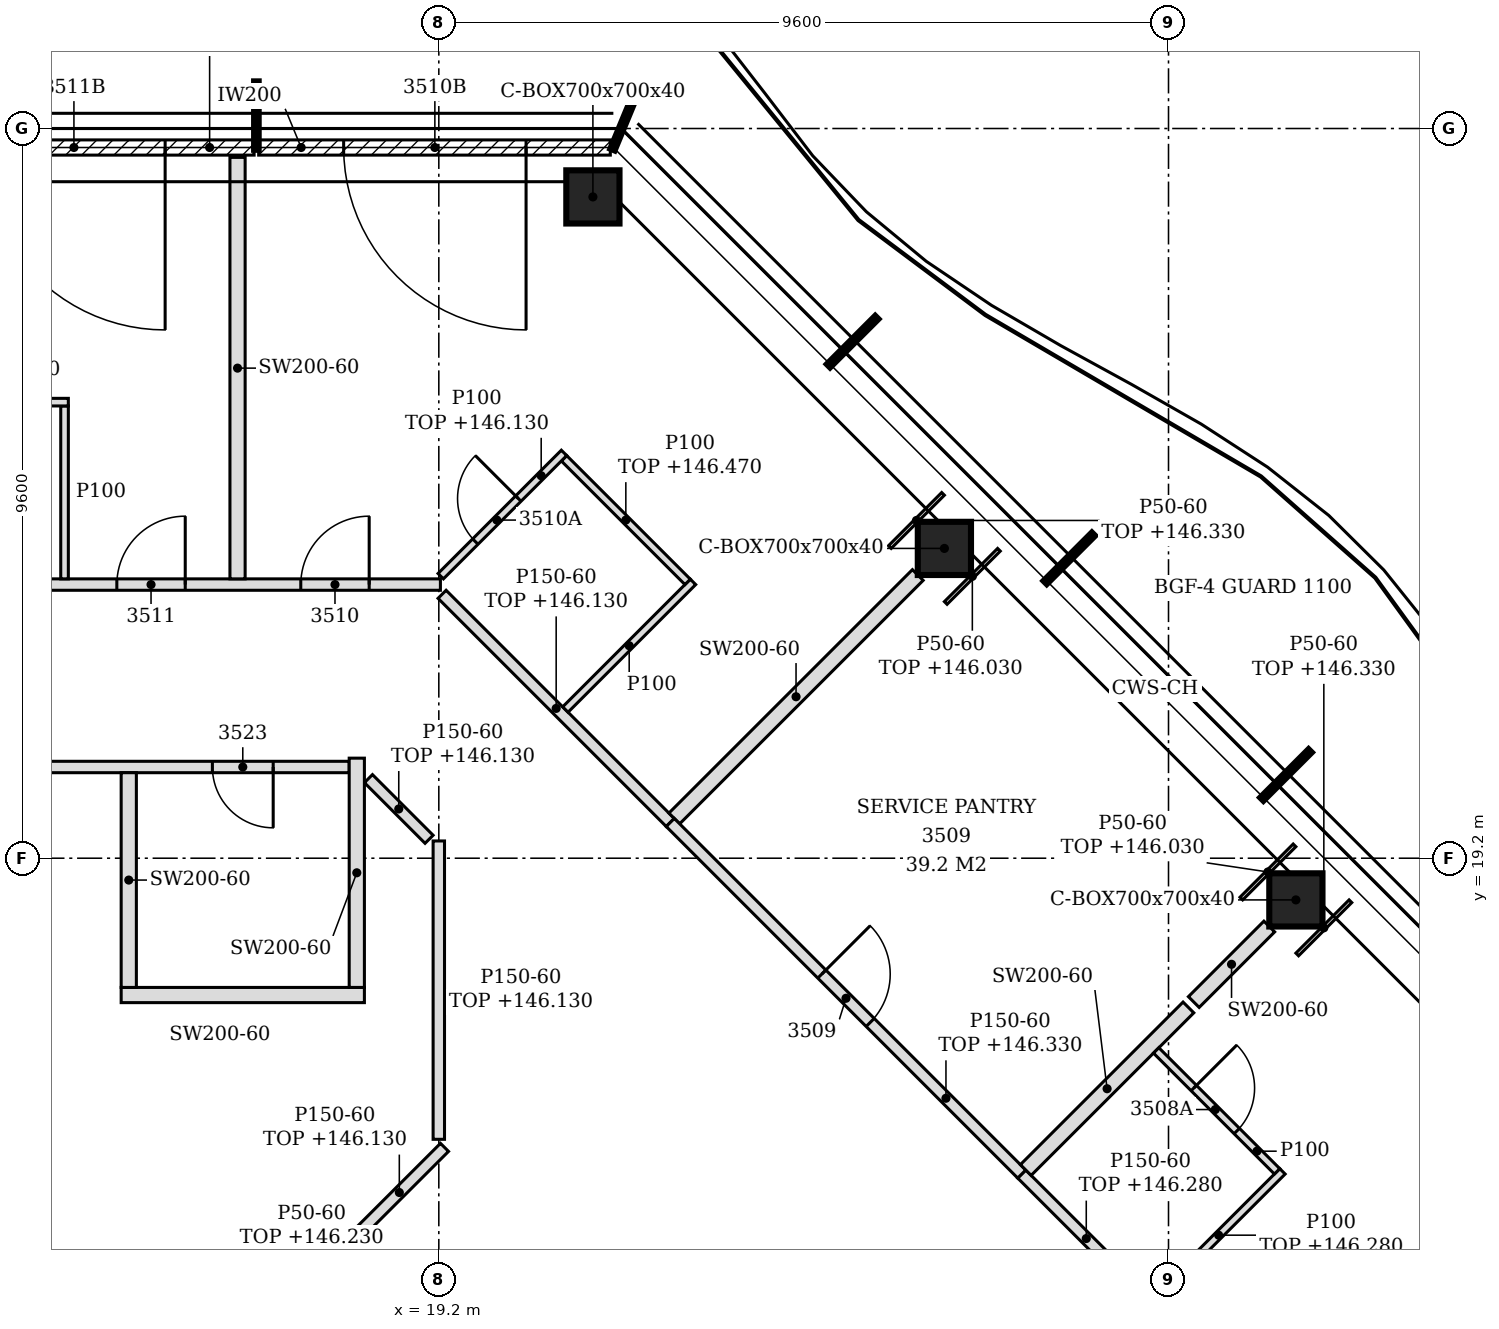
"""IFC4 building model, lengths in metres.
Left out: names, types, materials, properties, quantities, classifications, styles, units other than length and angle.
Written with IfcOpenShell. Run it as: python <this file> out.ifc"""

import sys

from ifc_helpers import new_model, si_unit, direction, frame, frame_2d, origin, origin_2d, place, context, subcontext, project, spatial, polyline, rectangle, hollow_rectangle, outline, extrude, element, fill, save


model = new_model("IFC4")
c1 = context("Model", 3, precision=1e-05, world=origin(), true_north=direction((0.0, 1.0)))
c2 = subcontext(c1, "Body", "Model", "MODEL_VIEW")
j1 = project(units=[si_unit("LENGTHUNIT", "METRE"), si_unit("PLANEANGLEUNIT", "RADIAN")], contexts=[c1])
p1 = place(None, origin())
s1 = spatial("IfcSite", under=j1, at=p1, CompositionType="ELEMENT")
p2 = place(p1, origin())
s2 = spatial("IfcBuilding", under=s1, at=p2, CompositionType="ELEMENT")
p3 = place(p2, frame((0.0, 0.0, 143.4)))
s3 = spatial("IfcBuildingStorey", under=s2, at=p3, CompositionType="ELEMENT", Elevation=143.4)
for number, where, z_axis, x_axis in (
    (1, (30.476, 18.652, -0.15), (0.0, 0.0, 1.0), (1.0, 0.0, 0.0)),
    (2, (25.852, 23.276, -0.15), (0.0, 0.0, 1.0), (1.0, 0.0, 0.0)),
    (3, (21.227, 27.9, -0.15), (0.0, 0.0, 1.0), (1.0, 0.0, 0.0)),
):
    element("IfcColumn", number, at=place(p3, frame(where, z_axis=z_axis, x_axis=x_axis)), inside=s3, PredefinedType="COLUMN", context=c2, shape_type="SweptSolid", body=[
        extrude(hollow_rectangle(XDim=0.7, YDim=0.7, WallThickness=0.04, at=origin_2d()), origin(), (0.0, 0.0, 1.0), 3.6),
    ])
p4 = place(p3, frame((21.457, 28.55, 0.0), z_axis=(0.0, 0.0, 1.0), x_axis=(-1.0, 0.0, 0.0)))
e4 = element("IfcWall", 4, at=p4, inside=s3, PredefinedType="NOTDEFINED", context=c2, shape_type="SweptSolid", body=[
    extrude(rectangle(XDim=4.626, YDim=0.2, at=frame_2d((2.313, 0.0))), origin(), (0.0, 0.0, 1.0), 3.45),
])
p5 = place(p4, frame((1.108, 0.0, 0.0)))
e5 = element("IfcOpeningElement", 5, at=p5, cuts=e4, PredefinedType="OPENING", context=c2, shape_type="SweptSolid", body=[
    extrude(rectangle(XDim=2.4, YDim=2.4, at=frame_2d((1.2, 1.2))), frame((0.0, 0.11, 0.0), z_axis=(0.0, -1.0, 0.0), x_axis=(1.0, 0.0, 0.0)), (0.0, 0.0, 1.0), 0.22),
])
p6 = place(p3, frame((16.77, 28.55, 0.0), z_axis=(0.0, 0.0, 1.0), x_axis=(-1.0, 0.0, 0.0)))
e6 = element("IfcWall", 6, at=p6, inside=s3, PredefinedType="NOTDEFINED", context=c2, shape_type="SweptSolid", body=[
    extrude(rectangle(XDim=4.74, YDim=0.2, at=frame_2d((2.37, 0.0))), origin(), (0.0, 0.0, 1.0), 3.45),
])
p7 = place(p6, frame((1.17, 0.0, 0.0)))
e7 = element("IfcOpeningElement", 7, at=p7, cuts=e6, PredefinedType="OPENING", context=c2, shape_type="SweptSolid", body=[
    extrude(rectangle(XDim=2.4, YDim=2.4, at=frame_2d((1.2, 1.2))), frame((0.0, 0.11, 0.0), z_axis=(0.0, -1.0, 0.0), x_axis=(1.0, 0.0, 0.0)), (0.0, 0.0, 1.0), 0.22),
])
p8 = place(p3, frame((28.567, 13.348, 0.0), z_axis=(0.0, 0.0, 1.0), x_axis=(-0.707310148094, 0.706903355773, 0.0)))
e8 = element("IfcWall", 8, at=p8, inside=s3, PredefinedType="PARTITIONING", context=c2, shape_type="SweptSolid", body=[
    extrude(rectangle(XDim=2.401, YDim=0.15, at=frame_2d((1.2, 0.0))), origin(), (0.0, 0.0, 1.0), 2.88),
])
p9 = place(p3, frame((18.991, 13.408, 0.0), z_axis=(0.0, 0.0, 1.0), x_axis=(-0.706998801226, 0.70721474466, 0.0)))
e9 = element("IfcWall", 9, at=p9, inside=s3, PredefinedType="PARTITIONING", context=c2, shape_type="SweptSolid", body=[
    extrude(rectangle(XDim=1.131, YDim=0.15, at=frame_2d((0.565, 0.0))), origin(), (0.0, 0.0, 1.0), 3.45),
])
p10 = place(p3, frame((28.62, 13.401, 0.0), z_axis=(0.0, 0.0, 1.0), x_axis=(0.707055379538, 0.707158179099, 0.0)))
e10 = element("IfcWall", 10, at=p10, inside=s3, PredefinedType="PARTITIONING", context=c2, shape_type="SweptSolid", body=[
    extrude(rectangle(XDim=2.375, YDim=0.1, at=frame_2d((1.188, 0.0))), origin(), (0.0, 0.0, 1.0), 2.88),
])
p11 = place(p3, frame((18.086, 14.208, 0.0), z_axis=(0.0, 0.0, 1.0), x_axis=(0.70739723372, 0.706816209298, 0.0)))
e11 = element("IfcWall", 11, at=p11, inside=s3, PredefinedType="PARTITIONING", context=c2, shape_type="SweptSolid", body=[
    extrude(rectangle(XDim=1.681, YDim=0.15, at=frame_2d((0.84, 0.0))), origin(), (0.0, 0.0, 1.0), 2.73),
])
p12 = place(p3, frame((26.869, 15.045, 0.0), z_axis=(0.0, 0.0, 1.0), x_axis=(-0.707013447311, 0.707200102744, 0.0)))
e12 = element("IfcWall", 12, at=p12, inside=s3, PredefinedType="PARTITIONING", context=c2, shape_type="SweptSolid", body=[
    extrude(rectangle(XDim=6.54, YDim=0.15, at=frame_2d((3.27, 0.0))), origin(), (0.0, 0.0, 1.0), 2.93),
])
p13 = place(p12, frame((2.82, 0.0, 0.0)))
e13 = element("IfcOpeningElement", 13, at=p13, cuts=e12, PredefinedType="OPENING", context=c2, shape_type="SweptSolid", body=[
    extrude(rectangle(XDim=0.9, YDim=2.1, at=frame_2d((0.45, 1.05))), frame((0.0, 0.085, 0.0), z_axis=(0.0, -1.0, 0.0), x_axis=(1.0, 0.0, 0.0)), (0.0, 0.0, 1.0), 0.17),
])
p14 = place(p3, frame((26.922, 15.098, 0.0), z_axis=(0.0, 0.0, 1.0), x_axis=(0.707268147401, 0.706945378138, 0.0)))
e14 = element("IfcWall", 14, at=p14, inside=s3, PredefinedType="PARTITIONING", context=c2, shape_type="SweptSolid", body=[
    extrude(rectangle(XDim=3.026, YDim=0.2, at=frame_2d((1.513, 0.0))), origin(), (0.0, 0.0, 1.0), 3.45),
])
p15 = place(p3, frame((30.229, 15.08, 0.0), z_axis=(0.0, 0.0, 1.0), x_axis=(-0.707052524, 0.70716103421, 0.0)))
e15 = element("IfcWall", 15, at=p15, inside=s3, PredefinedType="PARTITIONING", context=c2, shape_type="SweptSolid", body=[
    extrude(rectangle(XDim=2.25, YDim=0.1, at=frame_2d((1.125, 0.0))), origin(), (0.0, 0.0, 1.0), 3.45),
])
p16 = place(p15, frame((0.75, 0.0, 0.0)))
e16 = element("IfcOpeningElement", 16, at=p16, cuts=e15, PredefinedType="OPENING", context=c2, shape_type="SweptSolid", body=[
    extrude(rectangle(XDim=0.8, YDim=2.1, at=frame_2d((0.4, 1.05))), frame((0.0, 0.06, 0.0), z_axis=(0.0, -1.0, 0.0), x_axis=(1.0, 0.0, 0.0)), (0.0, 0.0, 1.0), 0.12),
])
p17 = place(p3, frame((19.2, 15.502, 0.0), z_axis=(0.0, 0.0, 1.0), x_axis=(0.0, 1.0, 0.0)))
e17 = element("IfcWall", 17, at=p17, inside=s3, PredefinedType="PARTITIONING", context=c2, shape_type="SweptSolid", body=[
    extrude(rectangle(XDim=3.925, YDim=0.15, at=frame_2d((1.962, 0.0))), origin(), (0.0, 0.0, 1.0), 2.73),
])
p18 = place(p3, frame((29.133, 17.308, 0.0), z_axis=(0.0, 0.0, 1.0), x_axis=(0.70693298083, 0.707280538835, 0.0)))
e18 = element("IfcWall", 18, at=p18, inside=s3, PredefinedType="PARTITIONING", context=c2, shape_type="SweptSolid", body=[
    extrude(rectangle(XDim=1.405, YDim=0.2, at=frame_2d((0.702, 0.0))), origin(), (0.0, 0.0, 1.0), 3.45),
])
p19 = place(p3, frame((15.021, 17.4, 0.0), z_axis=(0.0, 0.0, 1.0), x_axis=(1.0, 0.0, 0.0)))
e19 = element("IfcWall", 19, at=p19, inside=s3, PredefinedType="PARTITIONING", context=c2, shape_type="SweptSolid", body=[
    extrude(rectangle(XDim=3.2, YDim=0.2, at=frame_2d((1.6, 0.0))), origin(), (0.0, 0.0, 1.0), 3.45),
])
p20 = place(p3, frame((15.121, 17.5, 0.0), z_axis=(0.0, 0.0, 1.0), x_axis=(0.0, 1.0, 0.0)))
e20 = element("IfcWall", 20, at=p20, inside=s3, PredefinedType="PARTITIONING", context=c2, shape_type="SweptSolid", body=[
    extrude(outline(polyline([(0.0, 0.0), (2.825, 0.0), (2.825, 3.45), (1.805, 3.45), (1.803, 2.88), (1.595, 2.88), (1.593, 3.45), (0.0, 3.45), (0.0, 0.0)])), frame((0.0, 0.1, 0.0), z_axis=(0.0, -1.0, 0.0), x_axis=(1.0, 0.0, 0.0)), (0.0, 0.0, 1.0), 0.2),
])
p21 = place(p3, frame((18.121, 17.5, 0.0), z_axis=(0.0, 0.0, 1.0), x_axis=(0.0, 1.0, 0.0)))
e21 = element("IfcWall", 21, at=p21, inside=s3, PredefinedType="PARTITIONING", context=c2, shape_type="SweptSolid", body=[
    extrude(outline(polyline([(0.0, 0.0), (3.016, 0.0), (3.016, 3.45), (1.805, 3.45), (1.803, 2.88), (1.595, 2.88), (1.593, 3.45), (0.0, 3.45), (0.0, 0.0)])), frame((0.0, 0.1, 0.0), z_axis=(0.0, -1.0, 0.0), x_axis=(1.0, 0.0, 0.0)), (0.0, 0.0, 1.0), 0.2),
])
p22 = place(p3, frame((19.072, 19.449, 0.0), z_axis=(0.0, 0.0, 1.0), x_axis=(-0.707106781187, 0.707106781187, 0.0)))
e22 = element("IfcWall", 22, at=p22, inside=s3, PredefinedType="PARTITIONING", context=c2, shape_type="SweptSolid", body=[
    extrude(rectangle(XDim=1.128, YDim=0.15, at=frame_2d((0.564, 0.0))), origin(), (0.0, 0.0, 1.0), 2.73),
])
p23 = place(p3, frame((22.245, 19.67, 0.0), z_axis=(0.0, 0.0, 1.0), x_axis=(-0.707106781187, 0.707106781187, 0.0)))
e23 = element("IfcWall", 23, at=p23, inside=s3, PredefinedType="PARTITIONING", context=c2, shape_type="SweptSolid", body=[
    extrude(rectangle(XDim=4.246, YDim=0.15, at=frame_2d((2.123, 0.0))), origin(), (0.0, 0.0, 1.0), 2.73),
])
p24 = place(p3, frame((22.298, 19.723, 0.0), z_axis=(0.0, 0.0, 1.0), x_axis=(0.707160674466, 0.707052883799, 0.0)))
e24 = element("IfcWall", 24, at=p24, inside=s3, PredefinedType="PARTITIONING", context=c2, shape_type="SweptSolid", body=[
    extrude(rectangle(XDim=4.53, YDim=0.2, at=frame_2d((2.265, 0.0))), origin(), (0.0, 0.0, 1.0), 3.45),
])
p25 = place(p3, frame((7.125, 20.4, 0.0), z_axis=(0.0, 0.0, 1.0), x_axis=(1.0, 0.0, 0.0)))
e25 = element("IfcWall", 25, at=p25, inside=s3, PredefinedType="PARTITIONING", context=c2, shape_type="SweptSolid", body=[
    extrude(outline(polyline([(0.0, 0.0), (10.896, 0.0), (10.896, 3.45), (0.225, 3.45), (0.223, 2.73), (0.0, 2.73), (0.0, 0.0)])), frame((0.0, 0.075, 0.0), z_axis=(0.0, -1.0, 0.0), x_axis=(1.0, 0.0, 0.0)), (0.0, 0.0, 1.0), 0.15),
])
p26 = place(p25, frame((9.096, 0.0, 0.0)))
e26 = element("IfcOpeningElement", 26, at=p26, cuts=e25, PredefinedType="OPENING", context=c2, shape_type="SweptSolid", body=[
    extrude(rectangle(XDim=0.8, YDim=2.1, at=frame_2d((0.4, 1.05))), frame((0.0, 0.085, 0.0), z_axis=(0.0, -1.0, 0.0), x_axis=(1.0, 0.0, 0.0)), (0.0, 0.0, 1.0), 0.17),
])
p27 = place(p3, frame((20.865, 21.156, 0.0), z_axis=(0.0, 0.0, 1.0), x_axis=(0.707106781187, 0.707106781187, 0.0)))
e27 = element("IfcWall", 27, at=p27, inside=s3, PredefinedType="PARTITIONING", context=c2, shape_type="SweptSolid", body=[
    extrude(rectangle(XDim=2.375, YDim=0.1, at=frame_2d((1.188, 0.0))), origin(), (0.0, 0.0, 1.0), 3.45),
])
p28 = place(p3, frame((-4.821, 22.8, 0.0), z_axis=(0.0, 0.0, 1.0), x_axis=(1.0, 0.0, 0.0)))
e28 = element("IfcWall", 28, at=p28, inside=s3, PredefinedType="PARTITIONING", context=c2, shape_type="SweptSolid", body=[
    extrude(outline(polyline([(0.0, 0.0), (24.042, 0.0), (24.042, 2.73), (23.871, 2.73), (23.869, 3.45), (12.171, 3.45), (12.169, 2.73), (11.871, 2.73), (11.869, 3.45), (0.171, 3.45), (0.169, 2.73), (0.0, 2.73), (0.0, 0.0)])), frame((0.0, 0.075, 0.0), z_axis=(0.0, -1.0, 0.0), x_axis=(1.0, 0.0, 0.0)), (0.0, 0.0, 1.0), 0.15),
])
p29 = place(p28, frame((22.205, 0.0, 0.0)))
e29 = element("IfcOpeningElement", 29, at=p29, cuts=e28, PredefinedType="OPENING", context=c2, shape_type="SweptSolid", body=[
    extrude(rectangle(XDim=0.9, YDim=2.1, at=frame_2d((0.45, 1.05))), frame((0.0, 0.085, 0.0), z_axis=(0.0, -1.0, 0.0), x_axis=(1.0, 0.0, 0.0)), (0.0, 0.0, 1.0), 0.17),
])
p30 = place(p28, frame((19.785, 0.0, 0.0)))
e30 = element("IfcOpeningElement", 30, at=p30, cuts=e28, PredefinedType="OPENING", context=c2, shape_type="SweptSolid", body=[
    extrude(rectangle(XDim=0.9, YDim=2.1, at=frame_2d((0.45, 1.05))), frame((0.0, 0.085, 0.0), z_axis=(0.0, -1.0, 0.0), x_axis=(1.0, 0.0, 0.0)), (0.0, 0.0, 1.0), 0.17),
])
p31 = place(p28, frame((15.109, 0.0, 0.0)))
e31 = element("IfcOpeningElement", 31, at=p31, cuts=e28, PredefinedType="OPENING", context=c2, shape_type="SweptSolid", body=[
    extrude(rectangle(XDim=0.9, YDim=2.1, at=frame_2d((0.45, 1.05))), frame((0.0, 0.085, 0.0), z_axis=(0.0, -1.0, 0.0), x_axis=(1.0, 0.0, 0.0)), (0.0, 0.0, 1.0), 0.17),
])
p32 = place(p28, frame((10.433, 0.0, 0.0)))
e32 = element("IfcOpeningElement", 32, at=p32, cuts=e28, PredefinedType="OPENING", context=c2, shape_type="SweptSolid", body=[
    extrude(rectangle(XDim=0.9, YDim=2.1, at=frame_2d((0.45, 1.05))), frame((0.0, 0.085, 0.0), z_axis=(0.0, -1.0, 0.0), x_axis=(1.0, 0.0, 0.0)), (0.0, 0.0, 1.0), 0.17),
])
p33 = place(p28, frame((5.757, 0.0, 0.0)))
e33 = element("IfcOpeningElement", 33, at=p33, cuts=e28, PredefinedType="OPENING", context=c2, shape_type="SweptSolid", body=[
    extrude(rectangle(XDim=0.9, YDim=2.1, at=frame_2d((0.45, 1.05))), frame((0.0, 0.085, 0.0), z_axis=(0.0, -1.0, 0.0), x_axis=(1.0, 0.0, 0.0)), (0.0, 0.0, 1.0), 0.17),
])
p34 = place(p28, frame((0.938, 0.0, 0.0)))
e34 = element("IfcOpeningElement", 34, at=p34, cuts=e28, PredefinedType="OPENING", context=c2, shape_type="SweptSolid", body=[
    extrude(rectangle(XDim=0.9, YDim=2.1, at=frame_2d((0.45, 1.05))), frame((0.0, 0.085, 0.0), z_axis=(0.0, -1.0, 0.0), x_axis=(1.0, 0.0, 0.0)), (0.0, 0.0, 1.0), 0.17),
])
p35 = place(p3, frame((22.474, 22.835, 0.0), z_axis=(0.0, 0.0, 1.0), x_axis=(-0.707106781187, 0.707106781187, 0.0)))
e35 = element("IfcWall", 35, at=p35, inside=s3, PredefinedType="PARTITIONING", context=c2, shape_type="SweptSolid", body=[
    extrude(rectangle(XDim=2.3, YDim=0.1, at=frame_2d((1.15, 0.0))), origin(), (0.0, 0.0, 1.0), 3.07),
])
p36 = place(p3, frame((14.276, 22.875, 0.0), z_axis=(0.0, 0.0, 1.0), x_axis=(0.0, 1.0, 0.0)))
e36 = element("IfcWall", 36, at=p36, inside=s3, PredefinedType="PARTITIONING", context=c2, shape_type="SweptSolid", body=[
    extrude(outline(polyline([(0.0, 0.0), (2.275, 0.0), (2.275, 3.45), (1.23, 3.45), (1.228, 2.88), (1.02, 2.88), (1.018, 3.45), (0.0, 3.45), (0.0, 0.0)])), frame((0.0, 0.05, 0.0), z_axis=(0.0, -1.0, 0.0), x_axis=(1.0, 0.0, 0.0)), (0.0, 0.0, 1.0), 0.1),
])
p37 = place(p3, frame((16.552, 22.875, 0.0), z_axis=(0.0, 0.0, 1.0), x_axis=(0.0, 1.0, 0.0)))
e37 = element("IfcWall", 37, at=p37, inside=s3, PredefinedType="PARTITIONING", context=c2, shape_type="SweptSolid", body=[
    extrude(outline(polyline([(0.0, 0.0), (5.545, 0.0), (5.545, 3.45), (5.175, 3.45), (5.173, 2.93), (4.875, 2.93), (4.873, 3.45), (1.23, 3.45), (1.228, 2.88), (1.02, 2.88), (1.018, 3.45), (0.0, 3.45), (0.0, 0.0)])), frame((0.0, 0.1, 0.0), z_axis=(0.0, -1.0, 0.0), x_axis=(1.0, 0.0, 0.0)), (0.0, 0.0, 1.0), 0.2),
])
p38 = place(p3, frame((19.225, 22.91, 0.0), z_axis=(0.0, 0.0, 1.0), x_axis=(0.707106781187, 0.707106781187, 0.0)))
e38 = element("IfcWall", 38, at=p38, inside=s3, PredefinedType="PARTITIONING", context=c2, shape_type="SweptSolid", body=[
    extrude(rectangle(XDim=2.294, YDim=0.1, at=frame_2d((1.147, 0.0))), origin(), (0.0, 0.0, 1.0), 2.73),
])
p39 = place(p38, frame((0.644, 0.0, 0.0)))
e39 = element("IfcOpeningElement", 39, at=p39, cuts=e38, PredefinedType="OPENING", context=c2, shape_type="SweptSolid", body=[
    extrude(rectangle(XDim=0.8, YDim=2.1, at=frame_2d((0.4, 1.05))), frame((0.0, 0.06, 0.0), z_axis=(0.0, -1.0, 0.0), x_axis=(1.0, 0.0, 0.0)), (0.0, 0.0, 1.0), 0.12),
])
p40 = place(p3, frame((11.976, 25.2, 0.0), z_axis=(0.0, 0.0, 1.0), x_axis=(1.0, 0.0, 0.0)))
e40 = element("IfcWall", 40, at=p40, inside=s3, PredefinedType="PARTITIONING", context=c2, shape_type="SweptSolid", body=[
    extrude(rectangle(XDim=2.35, YDim=0.1, at=frame_2d((1.175, 0.0))), origin(), (0.0, 0.0, 1.0), 3.45),
])
p41 = place(p40, frame((0.7, 0.0, 0.0)))
e41 = element("IfcOpeningElement", 41, at=p41, cuts=e40, PredefinedType="OPENING", context=c2, shape_type="SweptSolid", body=[
    extrude(rectangle(XDim=0.8, YDim=2.1, at=frame_2d((0.4, 1.05))), frame((0.0, 0.06, 0.0), z_axis=(0.0, -1.0, 0.0), x_axis=(1.0, 0.0, 0.0)), (0.0, 0.0, 1.0), 0.12),
])
p42 = place(p3, frame((29.758, 18.669, 0.0), z_axis=(0.0, 0.0, 1.0), x_axis=(0.706983473703, 0.707230067171, 0.0)))
e42 = element("IfcWall", 42, at=p42, inside=s3, PredefinedType="PARTITIONING", context=c2, shape_type="SweptSolid", body=[
    extrude(rectangle(XDim=0.99, YDim=0.05, at=frame_2d((0.495, 0.0))), origin(), (0.0, 0.0, 1.0), 2.63),
])
for number, where, z_axis, x_axis in (
    (43, (30.493, 17.934, 0.0), (0.0, 0.0, 1.0), (0.707, 0.707, 0.0)),
    (44, (25.134, 23.293, 0.0), (0.0, 0.0, 1.0), (0.707, 0.707, 0.0)),
):
    element("IfcWall", number, at=place(p3, frame(where, z_axis=z_axis, x_axis=x_axis)), inside=s3, PredefinedType="PARTITIONING", context=c2, shape_type="SweptSolid", body=[
        extrude(rectangle(XDim=0.99, YDim=0.05, at=frame_2d((0.495, 0.0))), origin(), (0.0, 0.0, 1.0), 2.93),
    ])
p43 = place(p3, frame((25.869, 22.558, 0.0), z_axis=(0.0, 0.0, 1.0), x_axis=(0.707230110177, 0.706983430682, 0.0)))
e45 = element("IfcWall", 45, at=p43, inside=s3, PredefinedType="PARTITIONING", context=c2, shape_type="SweptSolid", body=[
    extrude(rectangle(XDim=0.99, YDim=0.05, at=frame_2d((0.495, 0.0))), origin(), (0.0, 0.0, 1.0), 2.63),
])
p44 = place(p5, origin())
e46 = element("IfcDoor", 46, at=p44, inside=s3, OperationType="SINGLE_SWING_LEFT", PredefinedType="DOOR", context=c2, shape_type="SweptSolid", body=[
    extrude(rectangle(XDim=2.4, YDim=2.4, at=frame_2d((1.2, 1.2))), frame((0.0, 0.025, 0.0), z_axis=(0.0, -1.0, 0.0), x_axis=(1.0, 0.0, 0.0)), (0.0, 0.0, 1.0), 0.05),
])
fill(e5, e46)
p45 = place(p7, origin())
e47 = element("IfcDoor", 47, at=p45, inside=s3, OperationType="SINGLE_SWING_LEFT", PredefinedType="DOOR", context=c2, shape_type="SweptSolid", body=[
    extrude(rectangle(XDim=2.4, YDim=2.4, at=frame_2d((1.2, 1.2))), frame((0.0, 0.025, 0.0), z_axis=(0.0, -1.0, 0.0), x_axis=(1.0, 0.0, 0.0)), (0.0, 0.0, 1.0), 0.05),
])
fill(e7, e47)
p46 = place(p16, frame((0.8, 0.0, 0.0), z_axis=(0.0, 0.0, 1.0), x_axis=(-1.0, 0.0, 0.0)))
e48 = element("IfcDoor", 48, at=p46, inside=s3, OperationType="SINGLE_SWING_LEFT", PredefinedType="DOOR", context=c2, shape_type="SweptSolid", body=[
    extrude(rectangle(XDim=0.8, YDim=2.1, at=frame_2d((0.4, 1.05))), frame((0.0, 0.025, 0.0), z_axis=(0.0, -1.0, 0.0), x_axis=(1.0, 0.0, 0.0)), (0.0, 0.0, 1.0), 0.05),
])
fill(e16, e48)
p47 = place(p13, frame((0.9, 0.0, 0.0), z_axis=(0.0, 0.0, 1.0), x_axis=(-1.0, 0.0, 0.0)))
e49 = element("IfcDoor", 49, at=p47, inside=s3, OperationType="SINGLE_SWING_LEFT", PredefinedType="DOOR", context=c2, shape_type="SweptSolid", body=[
    extrude(rectangle(XDim=0.9, YDim=2.1, at=frame_2d((0.45, 1.05))), frame((0.0, 0.025, 0.0), z_axis=(0.0, -1.0, 0.0), x_axis=(1.0, 0.0, 0.0)), (0.0, 0.0, 1.0), 0.05),
])
fill(e13, e49)
p48 = place(p29, origin())
e50 = element("IfcDoor", 50, at=p48, inside=s3, OperationType="SINGLE_SWING_RIGHT", PredefinedType="DOOR", context=c2, shape_type="SweptSolid", body=[
    extrude(rectangle(XDim=0.9, YDim=2.1, at=frame_2d((0.45, 1.05))), frame((0.0, 0.025, 0.0), z_axis=(0.0, -1.0, 0.0), x_axis=(1.0, 0.0, 0.0)), (0.0, 0.0, 1.0), 0.05),
])
fill(e29, e50)
p49 = place(p39, origin())
e51 = element("IfcDoor", 51, at=p49, inside=s3, OperationType="SINGLE_SWING_RIGHT", PredefinedType="DOOR", context=c2, shape_type="SweptSolid", body=[
    extrude(rectangle(XDim=0.8, YDim=2.1, at=frame_2d((0.4, 1.05))), frame((0.0, 0.025, 0.0), z_axis=(0.0, -1.0, 0.0), x_axis=(1.0, 0.0, 0.0)), (0.0, 0.0, 1.0), 0.05),
])
fill(e39, e51)
p50 = place(p30, origin())
e52 = element("IfcDoor", 52, at=p50, inside=s3, OperationType="SINGLE_SWING_RIGHT", PredefinedType="DOOR", context=c2, shape_type="SweptSolid", body=[
    extrude(rectangle(XDim=0.9, YDim=2.1, at=frame_2d((0.45, 1.05))), frame((0.0, 0.025, 0.0), z_axis=(0.0, -1.0, 0.0), x_axis=(1.0, 0.0, 0.0)), (0.0, 0.0, 1.0), 0.05),
])
fill(e30, e52)
p51 = place(p26, frame((0.8, 0.0, 0.0), z_axis=(0.0, 0.0, 1.0), x_axis=(-1.0, 0.0, 0.0)))
e53 = element("IfcDoor", 53, at=p51, inside=s3, OperationType="SINGLE_SWING_LEFT", PredefinedType="DOOR", context=c2, shape_type="SweptSolid", body=[
    extrude(rectangle(XDim=0.8, YDim=2.1, at=frame_2d((0.4, 1.05))), frame((0.0, 0.025, 0.0), z_axis=(0.0, -1.0, 0.0), x_axis=(1.0, 0.0, 0.0)), (0.0, 0.0, 1.0), 0.05),
])
fill(e26, e53)
save(model, sys.argv[1])
